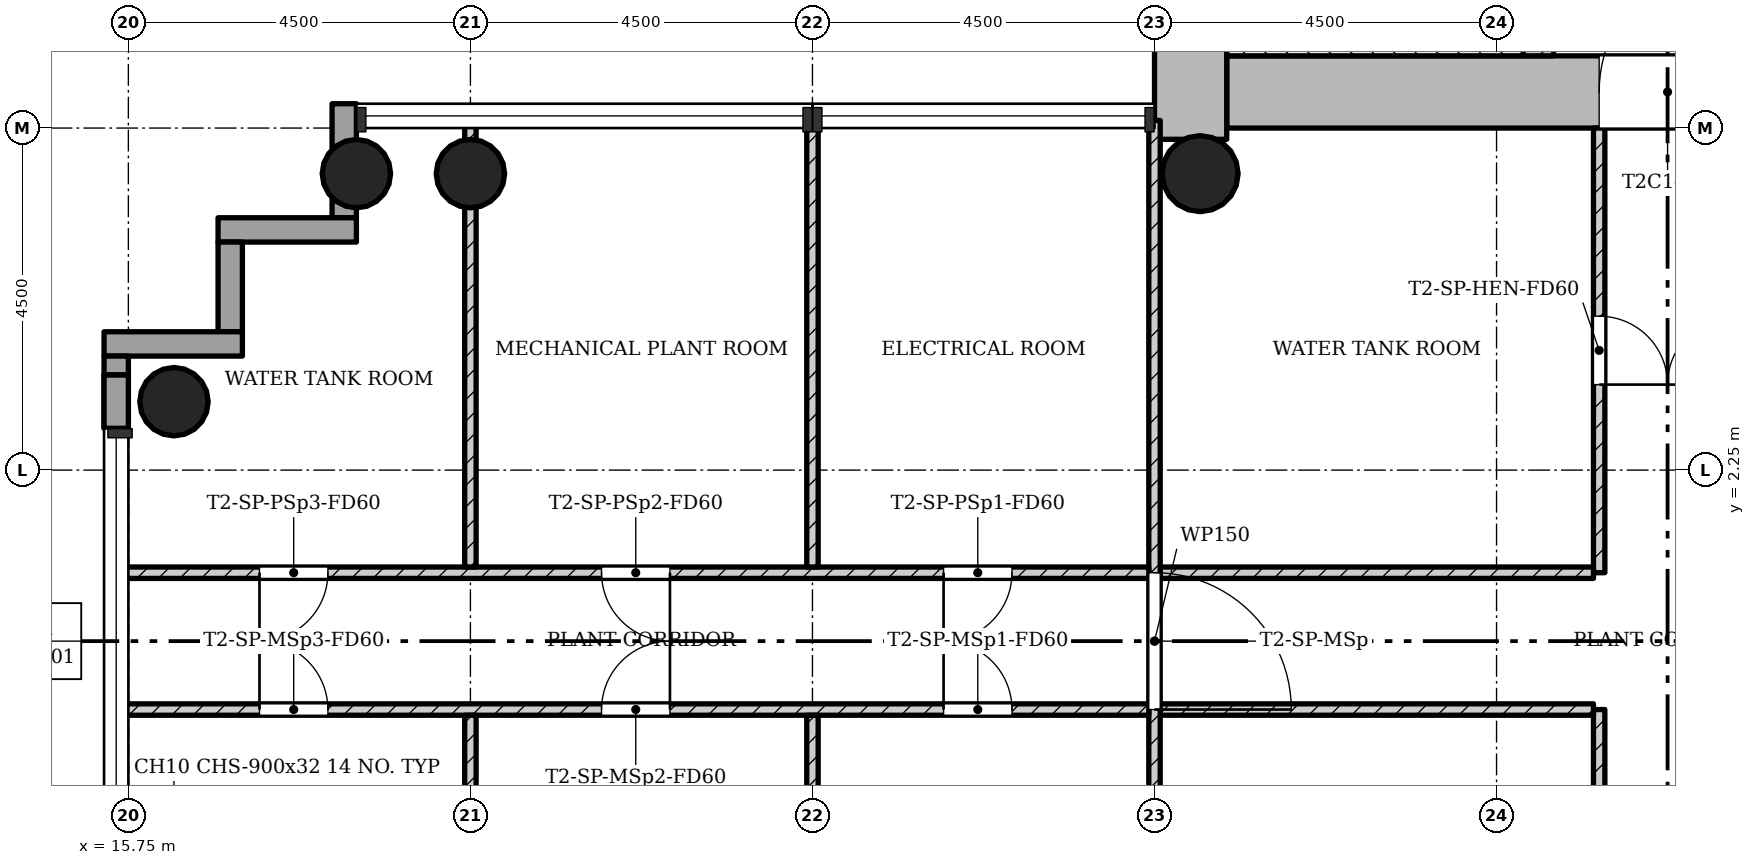
"""IFC4 building model, lengths in metres.
Left out: names, types, materials, properties, quantities, classifications, styles, units other than length and angle.
Written with IfcOpenShell. Run it as: python <this file> out.ifc"""

import sys

from ifc_helpers import new_model, si_unit, direction, frame, frame_2d, origin, origin_2d, place, context, subcontext, project, spatial, rectangle, hollow_circle, extrude, element, fill, save


model = new_model("IFC4")
c1 = context("Model", 3, precision=1e-05, world=origin(), true_north=direction((0.0, 1.0)))
c2 = subcontext(c1, "Body", "Model", "MODEL_VIEW")
j1 = project(units=[si_unit("LENGTHUNIT", "METRE"), si_unit("PLANEANGLEUNIT", "RADIAN")], contexts=[c1])
p1 = place(None, origin())
s1 = spatial("IfcSite", under=j1, at=p1, CompositionType="ELEMENT")
p2 = place(p1, origin())
s2 = spatial("IfcBuilding", under=s1, at=p2, CompositionType="ELEMENT")
p3 = place(p2, frame((0.0, 0.0, 124.2)))
s3 = spatial("IfcBuildingStorey", under=s2, at=p3, CompositionType="ELEMENT", Elevation=124.2)
p4 = place(p3, frame((30.2, 7.225, 0.0), z_axis=(0.0, 0.0, 1.0), x_axis=(1.0, 0.0, 0.0)))
e1 = element("IfcWall", 1, at=p4, inside=s3, PredefinedType="SHEAR", context=c2, shape_type="SweptSolid", body=[
    extrude(rectangle(XDim=12.55, YDim=0.95, at=frame_2d((6.275, 0.0))), origin(), (0.0, 0.0, 1.0), 4.5),
])
p5 = place(p4, frame((4.9, 0.0, 0.0)))
e2 = element("IfcOpeningElement", 2, at=p5, cuts=e1, PredefinedType="OPENING", context=c2, shape_type="SweptSolid", body=[
    extrude(rectangle(XDim=1.8, YDim=2.1, at=frame_2d((0.9, 1.05))), frame((0.0, 0.485, 0.0), z_axis=(0.0, -1.0, 0.0), x_axis=(1.0, 0.0, 0.0)), (0.0, 0.0, 1.0), 0.97),
])
p6 = place(p3, frame((29.725, 15.298, 0.0), z_axis=(0.0, 0.0, 1.0), x_axis=(0.0, -1.0, 0.0)))
e3 = element("IfcWall", 3, at=p6, inside=s3, PredefinedType="SHEAR", context=c2, shape_type="SweptSolid", body=[
    extrude(rectangle(XDim=8.696, YDim=0.95, at=frame_2d((4.348, 0.0))), origin(), (0.0, 0.0, 1.0), 4.5),
])
p7 = place(p3, frame((34.3, 7.7, 0.0), z_axis=(0.0, 0.0, 1.0), x_axis=(0.0, 1.0, 0.0)))
e4 = element("IfcWall", 4, at=p7, inside=s3, PredefinedType="SHEAR", context=c2, shape_type="SweptSolid", body=[
    extrude(rectangle(XDim=7.1, YDim=0.4, at=frame_2d((3.55, 0.0))), origin(), (0.0, 0.0, 1.0), 4.5),
])
p8 = place(p7, frame((0.7, 0.0, 0.0)))
e5 = element("IfcOpeningElement", 5, at=p8, cuts=e4, PredefinedType="OPENING", context=c2, shape_type="SweptSolid", body=[
    extrude(rectangle(XDim=0.9, YDim=2.1, at=frame_2d((0.45, 1.05))), frame((0.0, 0.21, 0.0), z_axis=(0.0, -1.0, 0.0), x_axis=(1.0, 0.0, 0.0)), (0.0, 0.0, 1.0), 0.42),
])
for number, where, z_axis, x_axis in (
    (6, (20.25, 6.15, 0.0), (0.0, 0.0, 1.0), (1.0, 0.0, 0.0)),
    (7, (18.75, 6.15, 0.0), (0.0, 0.0, 1.0), (1.0, 0.0, 0.0)),
    (8, (16.35, 3.15, 0.0), (0.0, 0.0, 1.0), (1.0, 0.0, 0.0)),
):
    element("IfcColumn", number, at=place(p3, frame(where, z_axis=z_axis, x_axis=x_axis)), inside=s3, PredefinedType="COLUMN", context=c2, shape_type="SweptSolid", body=[
        extrude(hollow_circle(Radius=0.45, WallThickness=0.032, at=origin_2d()), origin(), (0.0, 0.0, 1.0), 4.5),
    ])
p9 = place(p3, frame((29.85, 6.15, 0.0), z_axis=(0.0, 0.0, 1.0), x_axis=(1.0, 0.0, 0.0)))
e9 = element("IfcColumn", 9, at=p9, inside=s3, PredefinedType="COLUMN", context=c2, shape_type="SweptSolid", body=[
    extrude(hollow_circle(Radius=0.5, WallThickness=0.036, at=origin_2d()), origin(), (0.0, 0.0, 1.0), 4.5),
])
p10 = place(p3, frame((18.59, 7.07, -0.3), z_axis=(0.0, 0.0, 1.0), x_axis=(0.0, -1.0, 0.0)))
e10 = element("IfcWall", 10, at=p10, inside=s3, PredefinedType="STANDARD", context=c2, shape_type="SweptSolid", body=[
    extrude(rectangle(XDim=1.5, YDim=0.32, at=frame_2d((0.75, 0.0))), origin(), (0.0, 0.0, 1.0), 4.5),
])
p11 = place(p3, frame((18.75, 5.41, -0.3), z_axis=(0.0, 0.0, 1.0), x_axis=(-1.0, 0.0, 0.0)))
e11 = element("IfcWall", 11, at=p11, inside=s3, PredefinedType="STANDARD", context=c2, shape_type="SweptSolid", body=[
    extrude(rectangle(XDim=1.82, YDim=0.32, at=frame_2d((0.91, 0.0))), origin(), (0.0, 0.0, 1.0), 4.5),
])
p12 = place(p3, frame((17.09, 5.25, -0.3), z_axis=(0.0, 0.0, 1.0), x_axis=(0.0, -1.0, 0.0)))
e12 = element("IfcWall", 12, at=p12, inside=s3, PredefinedType="STANDARD", context=c2, shape_type="SweptSolid", body=[
    extrude(rectangle(XDim=1.18, YDim=0.32, at=frame_2d((0.59, 0.0))), origin(), (0.0, 0.0, 1.0), 4.5),
])
p13 = place(p3, frame((17.25, 3.91, -0.3), z_axis=(0.0, 0.0, 1.0), x_axis=(-1.0, 0.0, 0.0)))
e13 = element("IfcWall", 13, at=p13, inside=s3, PredefinedType="STANDARD", context=c2, shape_type="SweptSolid", body=[
    extrude(rectangle(XDim=1.82, YDim=0.32, at=frame_2d((0.91, 0.0))), origin(), (0.0, 0.0, 1.0), 4.5),
])
p14 = place(p3, frame((15.59, 3.75, 0.0), z_axis=(0.0, 0.0, 1.0), x_axis=(0.0, -1.0, 0.0)))
e14 = element("IfcWall", 14, at=p14, inside=s3, PredefinedType="STANDARD", context=c2, shape_type="SweptSolid", body=[
    extrude(rectangle(XDim=0.25, YDim=0.32, at=frame_2d((0.125, 0.0))), origin(), (0.0, 0.0, 1.0), 4.2),
])
p15 = place(p3, frame((15.59, 3.5, 0.0), z_axis=(0.0, 0.0, 1.0), x_axis=(0.0, -1.0, 0.0)))
e15 = element("IfcWall", 15, at=p15, inside=s3, PredefinedType="STANDARD", context=c2, shape_type="SweptSolid", body=[
    extrude(rectangle(XDim=0.7, YDim=0.32, at=frame_2d((0.35, 0.0))), origin(), (0.0, 0.0, 1.0), 3.61),
])
p16 = place(p3, frame((15.59, 3.5, 4.08), z_axis=(0.0, 0.0, 1.0), x_axis=(0.0, -1.0, 0.0)))
e16 = element("IfcWall", 16, at=p16, inside=s3, PredefinedType="STANDARD", context=c2, shape_type="SweptSolid", body=[
    extrude(rectangle(XDim=0.7, YDim=0.32, at=frame_2d((0.35, 0.0))), origin(), (0.0, 0.0, 1.0), 0.12),
])
p17 = place(p3, frame((35.1, 0.9, 0.0), z_axis=(0.0, 0.0, 1.0), x_axis=(0.0, 1.0, 0.0)))
e17 = element("IfcWall", 17, at=p17, inside=s3, PredefinedType="PARTITIONING", context=c2, shape_type="SweptSolid", body=[
    extrude(rectangle(XDim=5.85, YDim=0.15, at=frame_2d((2.925, 0.0))), origin(), (0.0, 0.0, 1.0), 4.1),
])
p18 = place(p17, frame((2.475, 0.0, 0.0)))
e18 = element("IfcOpeningElement", 18, at=p18, cuts=e17, PredefinedType="OPENING", context=c2, shape_type="SweptSolid", body=[
    extrude(rectangle(XDim=0.9, YDim=2.1, at=frame_2d((0.45, 1.05))), frame((0.0, 0.085, 0.0), z_axis=(0.0, -1.0, 0.0), x_axis=(1.0, 0.0, 0.0)), (0.0, 0.0, 1.0), 0.17),
])
p19 = place(p3, frame((35.025, 0.9, 0.0), z_axis=(0.0, 0.0, 1.0), x_axis=(-1.0, 0.0, 0.0)))
e19 = element("IfcWall", 19, at=p19, inside=s3, PredefinedType="PARTITIONING", context=c2, shape_type="SweptSolid", body=[
    extrude(rectangle(XDim=5.7, YDim=0.15, at=frame_2d((2.85, 0.0))), origin(), (0.0, 0.0, 1.0), 4.1),
])
p20 = place(p3, frame((35.1, -6.75, 0.0), z_axis=(0.0, 0.0, 1.0), x_axis=(0.0, 1.0, 0.0)))
e20 = element("IfcWall", 20, at=p20, inside=s3, PredefinedType="PARTITIONING", context=c2, shape_type="SweptSolid", body=[
    extrude(rectangle(XDim=5.85, YDim=0.15, at=frame_2d((2.925, 0.0))), origin(), (0.0, 0.0, 1.0), 4.1),
])
p21 = place(p20, frame((2.475, 0.0, 0.0)))
e21 = element("IfcOpeningElement", 21, at=p21, cuts=e20, PredefinedType="OPENING", context=c2, shape_type="SweptSolid", body=[
    extrude(rectangle(XDim=0.9, YDim=2.1, at=frame_2d((0.45, 1.05))), frame((0.0, 0.085, 0.0), z_axis=(0.0, -1.0, 0.0), x_axis=(1.0, 0.0, 0.0)), (0.0, 0.0, 1.0), 0.17),
])
p22 = place(p3, frame((35.025, -0.9, 0.0), z_axis=(0.0, 0.0, 1.0), x_axis=(-1.0, 0.0, 0.0)))
e22 = element("IfcWall", 22, at=p22, inside=s3, PredefinedType="PARTITIONING", context=c2, shape_type="SweptSolid", body=[
    extrude(rectangle(XDim=5.7, YDim=0.15, at=frame_2d((2.85, 0.0))), origin(), (0.0, 0.0, 1.0), 4.1),
])
p23 = place(p3, frame((29.25, -6.85, 0.0), z_axis=(0.0, 0.0, 1.0), x_axis=(0.0, 1.0, 0.0)))
e23 = element("IfcWall", 23, at=p23, inside=s3, PredefinedType="PARTITIONING", context=c2, shape_type="SweptSolid", body=[
    extrude(rectangle(XDim=13.7, YDim=0.15, at=frame_2d((6.85, 0.0))), origin(), (0.0, 0.0, 1.0), 4.1),
])
p24 = place(p23, frame((5.95, 0.0, 0.0)))
e24 = element("IfcOpeningElement", 24, at=p24, cuts=e23, PredefinedType="OPENING", context=c2, shape_type="SweptSolid", body=[
    extrude(rectangle(XDim=1.8, YDim=2.1, at=frame_2d((0.9, 1.05))), frame((0.0, 0.085, 0.0), z_axis=(0.0, -1.0, 0.0), x_axis=(1.0, 0.0, 0.0)), (0.0, 0.0, 1.0), 0.17),
])
p25 = place(p3, frame((29.175, 0.9, 0.0), z_axis=(0.0, 0.0, 1.0), x_axis=(-1.0, 0.0, 0.0)))
e25 = element("IfcWall", 25, at=p25, inside=s3, PredefinedType="PARTITIONING", context=c2, shape_type="SweptSolid", body=[
    extrude(rectangle(XDim=13.525, YDim=0.15, at=frame_2d((6.763, 0.0))), origin(), (0.0, 0.0, 1.0), 4.1),
])
p26 = place(p25, frame((1.8, 0.0, 0.0)))
e26 = element("IfcOpeningElement", 26, at=p26, cuts=e25, PredefinedType="OPENING", context=c2, shape_type="SweptSolid", body=[
    extrude(rectangle(XDim=0.9, YDim=2.1, at=frame_2d((0.45, 1.05))), frame((0.0, 0.085, 0.0), z_axis=(0.0, -1.0, 0.0), x_axis=(1.0, 0.0, 0.0)), (0.0, 0.0, 1.0), 0.17),
])
p27 = place(p25, frame((6.3, 0.0, 0.0)))
e27 = element("IfcOpeningElement", 27, at=p27, cuts=e25, PredefinedType="OPENING", context=c2, shape_type="SweptSolid", body=[
    extrude(rectangle(XDim=0.9, YDim=2.1, at=frame_2d((0.45, 1.05))), frame((0.0, 0.085, 0.0), z_axis=(0.0, -1.0, 0.0), x_axis=(1.0, 0.0, 0.0)), (0.0, 0.0, 1.0), 0.17),
])
p28 = place(p25, frame((10.8, 0.0, 0.0)))
e28 = element("IfcOpeningElement", 28, at=p28, cuts=e25, PredefinedType="OPENING", context=c2, shape_type="SweptSolid", body=[
    extrude(rectangle(XDim=0.9, YDim=2.1, at=frame_2d((0.45, 1.05))), frame((0.0, 0.085, 0.0), z_axis=(0.0, -1.0, 0.0), x_axis=(1.0, 0.0, 0.0)), (0.0, 0.0, 1.0), 0.17),
])
for number, where, z_axis, x_axis in (
    (29, (24.75, 0.975, 0.0), (0.0, 0.0, 1.0), (0.0, 1.0, 0.0)),
    (30, (20.25, 0.975, 0.0), (0.0, 0.0, 1.0), (0.0, 1.0, 0.0)),
):
    element("IfcWall", number, at=place(p3, frame(where, z_axis=z_axis, x_axis=x_axis)), inside=s3, PredefinedType="PARTITIONING", context=c2, shape_type="SweptSolid", body=[
        extrude(rectangle(XDim=5.875, YDim=0.15, at=frame_2d((2.938, 0.0))), origin(), (0.0, 0.0, 1.0), 4.1),
    ])
p29 = place(p3, frame((29.175, -0.9, 0.0), z_axis=(0.0, 0.0, 1.0), x_axis=(-1.0, 0.0, 0.0)))
e31 = element("IfcWall", 31, at=p29, inside=s3, PredefinedType="PARTITIONING", context=c2, shape_type="SweptSolid", body=[
    extrude(rectangle(XDim=13.525, YDim=0.15, at=frame_2d((6.763, 0.0))), origin(), (0.0, 0.0, 1.0), 4.1),
])
p30 = place(p29, frame((1.8, 0.0, 0.0)))
e32 = element("IfcOpeningElement", 32, at=p30, cuts=e31, PredefinedType="OPENING", context=c2, shape_type="SweptSolid", body=[
    extrude(rectangle(XDim=0.9, YDim=2.1, at=frame_2d((0.45, 1.05))), frame((0.0, 0.085, 0.0), z_axis=(0.0, -1.0, 0.0), x_axis=(1.0, 0.0, 0.0)), (0.0, 0.0, 1.0), 0.17),
])
p31 = place(p29, frame((6.3, 0.0, 0.0)))
e33 = element("IfcOpeningElement", 33, at=p31, cuts=e31, PredefinedType="OPENING", context=c2, shape_type="SweptSolid", body=[
    extrude(rectangle(XDim=0.9, YDim=2.1, at=frame_2d((0.45, 1.05))), frame((0.0, 0.085, 0.0), z_axis=(0.0, -1.0, 0.0), x_axis=(1.0, 0.0, 0.0)), (0.0, 0.0, 1.0), 0.17),
])
p32 = place(p29, frame((10.8, 0.0, 0.0)))
e34 = element("IfcOpeningElement", 34, at=p32, cuts=e31, PredefinedType="OPENING", context=c2, shape_type="SweptSolid", body=[
    extrude(rectangle(XDim=0.9, YDim=2.1, at=frame_2d((0.45, 1.05))), frame((0.0, 0.085, 0.0), z_axis=(0.0, -1.0, 0.0), x_axis=(1.0, 0.0, 0.0)), (0.0, 0.0, 1.0), 0.17),
])
for number, where, z_axis, x_axis in (
    (35, (24.75, -0.975, 0.0), (0.0, 0.0, 1.0), (0.0, -1.0, 0.0)),
    (36, (20.25, -0.975, 0.0), (0.0, 0.0, 1.0), (0.0, -1.0, 0.0)),
):
    element("IfcWall", number, at=place(p3, frame(where, z_axis=z_axis, x_axis=x_axis)), inside=s3, PredefinedType="PARTITIONING", context=c2, shape_type="SweptSolid", body=[
        extrude(rectangle(XDim=5.875, YDim=0.15, at=frame_2d((2.938, 0.0))), origin(), (0.0, 0.0, 1.0), 4.1),
    ])
p33 = place(p3, frame((34.1, 7.825, 0.0), z_axis=(0.0, 0.0, 1.0), x_axis=(-1.0, 0.0, 0.0)))
e37 = element("IfcWall", 37, at=p33, inside=s3, PredefinedType="SHEAR", context=c2, shape_type="SweptSolid", body=[
    extrude(rectangle(XDim=3.9, YDim=0.25, at=frame_2d((1.95, 0.0))), origin(), (0.0, 0.0, 1.0), 4.5),
])
p34 = place(p18, origin())
e38 = element("IfcDoor", 38, at=p34, inside=s3, OperationType="SINGLE_SWING_LEFT", PredefinedType="DOOR", context=c2, shape_type="SweptSolid", body=[
    extrude(rectangle(XDim=0.9, YDim=2.1, at=frame_2d((0.45, 1.05))), frame((0.0, 0.025, 0.0), z_axis=(0.0, -1.0, 0.0), x_axis=(1.0, 0.0, 0.0)), (0.0, 0.0, 1.0), 0.05),
])
fill(e18, e38)
p35 = place(p24, origin())
e39 = element("IfcDoor", 39, at=p35, inside=s3, OperationType="SINGLE_SWING_LEFT", PredefinedType="DOOR", context=c2, shape_type="SweptSolid", body=[
    extrude(rectangle(XDim=1.8, YDim=2.1, at=frame_2d((0.9, 1.05))), frame((0.0, 0.025, 0.0), z_axis=(0.0, -1.0, 0.0), x_axis=(1.0, 0.0, 0.0)), (0.0, 0.0, 1.0), 0.05),
])
fill(e24, e39)
p36 = place(p26, origin())
e40 = element("IfcDoor", 40, at=p36, inside=s3, OperationType="SINGLE_SWING_LEFT", PredefinedType="DOOR", context=c2, shape_type="SweptSolid", body=[
    extrude(rectangle(XDim=0.9, YDim=2.1, at=frame_2d((0.45, 1.05))), frame((0.0, 0.025, 0.0), z_axis=(0.0, -1.0, 0.0), x_axis=(1.0, 0.0, 0.0)), (0.0, 0.0, 1.0), 0.05),
])
fill(e26, e40)
p37 = place(p27, origin())
e41 = element("IfcDoor", 41, at=p37, inside=s3, OperationType="SINGLE_SWING_RIGHT", PredefinedType="DOOR", context=c2, shape_type="SweptSolid", body=[
    extrude(rectangle(XDim=0.9, YDim=2.1, at=frame_2d((0.45, 1.05))), frame((0.0, 0.025, 0.0), z_axis=(0.0, -1.0, 0.0), x_axis=(1.0, 0.0, 0.0)), (0.0, 0.0, 1.0), 0.05),
])
fill(e27, e41)
p38 = place(p28, origin())
e42 = element("IfcDoor", 42, at=p38, inside=s3, OperationType="SINGLE_SWING_LEFT", PredefinedType="DOOR", context=c2, shape_type="SweptSolid", body=[
    extrude(rectangle(XDim=0.9, YDim=2.1, at=frame_2d((0.45, 1.05))), frame((0.0, 0.025, 0.0), z_axis=(0.0, -1.0, 0.0), x_axis=(1.0, 0.0, 0.0)), (0.0, 0.0, 1.0), 0.05),
])
fill(e28, e42)
p39 = place(p30, origin())
e43 = element("IfcDoor", 43, at=p39, inside=s3, OperationType="SINGLE_SWING_RIGHT", PredefinedType="DOOR", context=c2, shape_type="SweptSolid", body=[
    extrude(rectangle(XDim=0.9, YDim=2.1, at=frame_2d((0.45, 1.05))), frame((0.0, 0.025, 0.0), z_axis=(0.0, -1.0, 0.0), x_axis=(1.0, 0.0, 0.0)), (0.0, 0.0, 1.0), 0.05),
])
fill(e32, e43)
p40 = place(p31, origin())
e44 = element("IfcDoor", 44, at=p40, inside=s3, OperationType="SINGLE_SWING_LEFT", PredefinedType="DOOR", context=c2, shape_type="SweptSolid", body=[
    extrude(rectangle(XDim=0.9, YDim=2.1, at=frame_2d((0.45, 1.05))), frame((0.0, 0.025, 0.0), z_axis=(0.0, -1.0, 0.0), x_axis=(1.0, 0.0, 0.0)), (0.0, 0.0, 1.0), 0.05),
])
fill(e33, e44)
p41 = place(p32, origin())
e45 = element("IfcDoor", 45, at=p41, inside=s3, OperationType="SINGLE_SWING_RIGHT", PredefinedType="DOOR", context=c2, shape_type="SweptSolid", body=[
    extrude(rectangle(XDim=0.9, YDim=2.1, at=frame_2d((0.45, 1.05))), frame((0.0, 0.025, 0.0), z_axis=(0.0, -1.0, 0.0), x_axis=(1.0, 0.0, 0.0)), (0.0, 0.0, 1.0), 0.05),
])
fill(e34, e45)
p42 = place(p5, origin())
e46 = element("IfcDoor", 46, at=p42, inside=s3, OperationType="SINGLE_SWING_LEFT", PredefinedType="DOOR", context=c2, shape_type="SweptSolid", body=[
    extrude(rectangle(XDim=1.8, YDim=2.1, at=frame_2d((0.9, 1.05))), frame((0.0, 0.025, 0.0), z_axis=(0.0, -1.0, 0.0), x_axis=(1.0, 0.0, 0.0)), (0.0, 0.0, 1.0), 0.05),
])
fill(e2, e46)
save(model, sys.argv[1])
